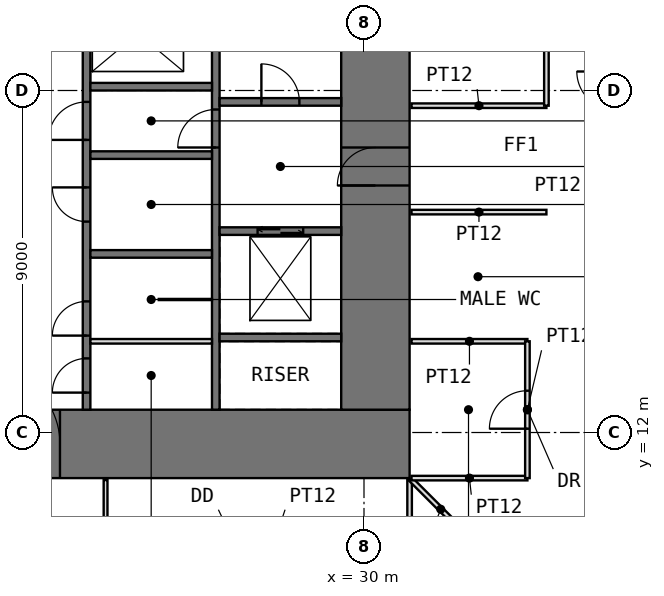
"""IFC4 building model, lengths in metres.
Left out: names, types, materials, properties, quantities, classifications, styles, units other than length and angle.
Written with IfcOpenShell. Run it as: python <this file> out.ifc"""

import sys

from ifc_helpers import new_model, si_unit, direction, frame, frame_2d, origin, place, context, subcontext, project, spatial, rectangle, extrude, element, fill, save


model = new_model("IFC4")
c1 = context("Model", 3, precision=1e-05, world=origin(), true_north=direction((0.0, 1.0)))
c2 = subcontext(c1, "Body", "Model", "MODEL_VIEW")
j1 = project(units=[si_unit("LENGTHUNIT", "METRE"), si_unit("PLANEANGLEUNIT", "RADIAN")], contexts=[c1])
p1 = place(None, origin())
s1 = spatial("IfcSite", under=j1, at=p1, CompositionType="ELEMENT")
p2 = place(p1, origin())
s2 = spatial("IfcBuilding", under=s1, at=p2, CompositionType="ELEMENT")
p3 = place(p2, frame((0.0, 0.0, 62.5)))
s3 = spatial("IfcBuildingStorey", under=s2, at=p3, CompositionType="ELEMENT", Elevation=62.5)
p4 = place(p3, frame((10.8, 11.7, -0.05), z_axis=(0.0, 0.0, 1.0), x_axis=(1.0, 0.0, 0.0)))
e1 = element("IfcWall", 1, at=p4, inside=s3, PredefinedType="SHEAR", context=c2, shape_type="SweptSolid", body=[
    extrude(rectangle(XDim=20.4, YDim=1.8, at=frame_2d((10.2, 0.0))), origin(), (0.0, 0.0, 1.0), 4.0),
])
p5 = place(p4, frame((9.2, 0.0, 0.05)))
e2 = element("IfcOpeningElement", 2, at=p5, cuts=e1, PredefinedType="OPENING", context=c2, shape_type="SweptSolid", body=[
    extrude(rectangle(XDim=2.0, YDim=2.2, at=frame_2d((1.0, 1.1))), frame((0.0, 0.91, 0.0), z_axis=(0.0, -1.0, 0.0), x_axis=(1.0, 0.0, 0.0)), (0.0, 0.0, 1.0), 1.82),
])
p6 = place(p3, frame((30.3, 12.6, -0.05), z_axis=(0.0, 0.0, 1.0), x_axis=(0.0, 1.0, 0.0)))
e3 = element("IfcWall", 3, at=p6, inside=s3, PredefinedType="SHEAR", context=c2, shape_type="SweptSolid", body=[
    extrude(rectangle(XDim=16.8, YDim=1.8, at=frame_2d((8.4, 0.0))), origin(), (0.0, 0.0, 1.0), 4.0),
])
p7 = place(p6, frame((5.9, 0.0, 0.05)))
e4 = element("IfcOpeningElement", 4, at=p7, cuts=e3, PredefinedType="OPENING", context=c2, shape_type="SweptSolid", body=[
    extrude(rectangle(XDim=1.0, YDim=2.2, at=frame_2d((0.5, 1.1))), frame((0.0, 0.91, 0.0), z_axis=(0.0, -1.0, 0.0), x_axis=(1.0, 0.0, 0.0)), (0.0, 0.0, 1.0), 1.82),
])
p8 = place(p3, frame((22.7, 12.6, -0.05), z_axis=(0.0, 0.0, 1.0), x_axis=(0.0, 1.0, 0.0)))
e5 = element("IfcWall", 5, at=p8, inside=s3, PredefinedType="SHEAR", context=c2, shape_type="SweptSolid", body=[
    extrude(rectangle(XDim=16.8, YDim=0.2, at=frame_2d((8.4, 0.0))), origin(), (0.0, 0.0, 1.0), 4.0),
])
p9 = place(p8, frame((0.45, 0.0, 0.05)))
e6 = element("IfcOpeningElement", 6, at=p9, cuts=e5, PredefinedType="OPENING", context=c2, shape_type="SweptSolid", body=[
    extrude(rectangle(XDim=0.9, YDim=2.2, at=frame_2d((0.45, 1.1))), frame((0.0, 0.11, 0.0), z_axis=(0.0, -1.0, 0.0), x_axis=(1.0, 0.0, 0.0)), (0.0, 0.0, 1.0), 0.22),
])
p10 = place(p8, frame((7.1, 0.0, 0.05)))
e7 = element("IfcOpeningElement", 7, at=p10, cuts=e5, PredefinedType="OPENING", context=c2, shape_type="SweptSolid", body=[
    extrude(rectangle(XDim=1.0, YDim=2.2, at=frame_2d((0.5, 1.1))), frame((0.0, 0.11, 0.0), z_axis=(0.0, -1.0, 0.0), x_axis=(1.0, 0.0, 0.0)), (0.0, 0.0, 1.0), 0.22),
])
p11 = place(p8, frame((1.95, 0.0, 0.05)))
e8 = element("IfcOpeningElement", 8, at=p11, cuts=e5, PredefinedType="OPENING", context=c2, shape_type="SweptSolid", body=[
    extrude(rectangle(XDim=0.9, YDim=2.2, at=frame_2d((0.45, 1.1))), frame((0.0, 0.11, 0.0), z_axis=(0.0, -1.0, 0.0), x_axis=(1.0, 0.0, 0.0)), (0.0, 0.0, 1.0), 0.22),
])
p12 = place(p8, frame((4.95, 0.0, 0.05)))
e9 = element("IfcOpeningElement", 9, at=p12, cuts=e5, PredefinedType="OPENING", context=c2, shape_type="SweptSolid", body=[
    extrude(rectangle(XDim=0.9, YDim=2.2, at=frame_2d((0.45, 1.1))), frame((0.0, 0.11, 0.0), z_axis=(0.0, -1.0, 0.0), x_axis=(1.0, 0.0, 0.0)), (0.0, 0.0, 1.0), 0.22),
])
p13 = place(p3, frame((26.1, 12.6, -0.05), z_axis=(0.0, 0.0, 1.0), x_axis=(0.0, 1.0, 0.0)))
e10 = element("IfcWall", 10, at=p13, inside=s3, PredefinedType="SHEAR", context=c2, shape_type="SweptSolid", body=[
    extrude(rectangle(XDim=16.8, YDim=0.2, at=frame_2d((8.4, 0.0))), origin(), (0.0, 0.0, 1.0), 4.0),
])
p14 = place(p13, frame((6.9, 0.0, 0.05)))
e11 = element("IfcOpeningElement", 11, at=p14, cuts=e10, PredefinedType="OPENING", context=c2, shape_type="SweptSolid", body=[
    extrude(rectangle(XDim=1.0, YDim=2.2, at=frame_2d((0.5, 1.1))), frame((0.0, 0.11, 0.0), z_axis=(0.0, -1.0, 0.0), x_axis=(1.0, 0.0, 0.0)), (0.0, 0.0, 1.0), 0.22),
])
for number, where, z_axis, x_axis in (
    (12, (22.8, 16.7, -0.05), (0.0, 0.0, 1.0), (1.0, 0.0, 0.0)),
    (13, (22.8, 19.3, -0.05), (0.0, 0.0, 1.0), (1.0, 0.0, 0.0)),
    (14, (22.8, 21.1, -0.05), (0.0, 0.0, 1.0), (1.0, 0.0, 0.0)),
    (15, (26.2, 14.5, -0.05), (0.0, 0.0, 1.0), (1.0, 0.0, 0.0)),
):
    element("IfcWall", number, at=place(p3, frame(where, z_axis=z_axis, x_axis=x_axis)), inside=s3, PredefinedType="SHEAR", context=c2, shape_type="SweptSolid", body=[
        extrude(rectangle(XDim=3.2, YDim=0.2, at=frame_2d((1.6, 0.0))), origin(), (0.0, 0.0, 1.0), 4.0),
    ])
p15 = place(p3, frame((26.2, 17.3, -0.05), z_axis=(0.0, 0.0, 1.0), x_axis=(1.0, 0.0, 0.0)))
e16 = element("IfcWall", 16, at=p15, inside=s3, PredefinedType="SHEAR", context=c2, shape_type="SweptSolid", body=[
    extrude(rectangle(XDim=3.2, YDim=0.2, at=frame_2d((1.6, 0.0))), origin(), (0.0, 0.0, 1.0), 4.0),
])
p16 = place(p15, frame((1.0, 0.0, 0.05)))
e17 = element("IfcOpeningElement", 17, at=p16, cuts=e16, PredefinedType="OPENING", context=c2, shape_type="SweptSolid", body=[
    extrude(rectangle(XDim=1.2, YDim=2.2, at=frame_2d((0.6, 1.1))), frame((0.0, 0.11, 0.0), z_axis=(0.0, -1.0, 0.0), x_axis=(1.0, 0.0, 0.0)), (0.0, 0.0, 1.0), 0.22),
])
p17 = place(p3, frame((26.2, 20.7, -0.05), z_axis=(0.0, 0.0, 1.0), x_axis=(1.0, 0.0, 0.0)))
e18 = element("IfcWall", 18, at=p17, inside=s3, PredefinedType="SHEAR", context=c2, shape_type="SweptSolid", body=[
    extrude(rectangle(XDim=3.2, YDim=0.2, at=frame_2d((1.6, 0.0))), origin(), (0.0, 0.0, 1.0), 4.0),
])
p18 = place(p17, frame((1.1, 0.0, 0.05)))
e19 = element("IfcOpeningElement", 19, at=p18, cuts=e18, PredefinedType="OPENING", context=c2, shape_type="SweptSolid", body=[
    extrude(rectangle(XDim=1.0, YDim=2.2, at=frame_2d((0.5, 1.1))), frame((0.0, 0.11, 0.0), z_axis=(0.0, -1.0, 0.0), x_axis=(1.0, 0.0, 0.0)), (0.0, 0.0, 1.0), 0.22),
])
p19 = place(p3, frame((22.8, 14.4, 0.0), z_axis=(0.0, 0.0, 1.0), x_axis=(1.0, 0.0, 0.0)))
e20 = element("IfcWall", 20, at=p19, inside=s3, PredefinedType="PARTITIONING", context=c2, shape_type="SweptSolid", body=[
    extrude(rectangle(XDim=3.2, YDim=0.12, at=frame_2d((1.6, 0.0))), origin(), (0.0, 0.0, 1.0), 3.75),
])
p20 = place(p3, frame((24.6, 15.5, 0.0), z_axis=(0.0, 0.0, 1.0), x_axis=(1.0, 0.0, 0.0)))
e21 = element("IfcWall", 21, at=p20, inside=s3, PredefinedType="PARTITIONING", context=c2, shape_type="SweptSolid", body=[
    extrude(rectangle(XDim=1.4, YDim=0.03, at=frame_2d((0.7, 0.0))), origin(), (0.0, 0.0, 1.0), 3.75),
])
p21 = place(p3, frame((23.2, 7.8, 0.0), z_axis=(0.0, 0.0, 1.0), x_axis=(0.0, 1.0, 0.0)))
e22 = element("IfcWall", 22, at=p21, inside=s3, PredefinedType="PARTITIONING", context=c2, shape_type="SweptSolid", body=[
    extrude(rectangle(XDim=2.95, YDim=0.1, at=frame_2d((1.475, 0.0))), origin(), (0.0, 0.0, 1.0), 3.75),
])
p22 = place(p3, frame((31.2, 7.8, 0.0), z_axis=(0.0, 0.0, 1.0), x_axis=(0.0, 1.0, 0.0)))
e23 = element("IfcWall", 23, at=p22, inside=s3, PredefinedType="PARTITIONING", context=c2, shape_type="SweptSolid", body=[
    extrude(rectangle(XDim=2.95, YDim=0.12, at=frame_2d((1.475, 0.0))), origin(), (0.0, 0.0, 1.0), 3.75),
])
p23 = place(p3, frame((31.235, 10.765, 0.0), z_axis=(0.0, 0.0, 1.0), x_axis=(0.707106781187, -0.707106781187, 0.0)))
e24 = element("IfcWall", 24, at=p23, inside=s3, PredefinedType="PARTITIONING", context=c2, shape_type="SweptSolid", body=[
    extrude(rectangle(XDim=2.218, YDim=0.12, at=frame_2d((1.109, 0.0))), origin(), (0.0, 0.0, 1.0), 3.75),
])
for number, where, z_axis, x_axis in (
    (25, (31.25, 10.8, 0.0), (0.0, 0.0, 1.0), (1.0, 0.0, 0.0)),
    (26, (31.25, 14.4, 0.0), (0.0, 0.0, 1.0), (1.0, 0.0, 0.0)),
):
    element("IfcWall", number, at=place(p3, frame(where, z_axis=z_axis, x_axis=x_axis)), inside=s3, PredefinedType="PARTITIONING", context=c2, shape_type="SweptSolid", body=[
        extrude(rectangle(XDim=3.05, YDim=0.12, at=frame_2d((1.525, 0.0))), origin(), (0.0, 0.0, 1.0), 3.75),
    ])
for number, where, z_axis, x_axis in (
    (27, (31.25, 17.8, 0.0), (0.0, 0.0, 1.0), (1.0, 0.0, 0.0)),
    (28, (31.25, 20.6, 0.0), (0.0, 0.0, 1.0), (1.0, 0.0, 0.0)),
):
    element("IfcWall", number, at=place(p3, frame(where, z_axis=z_axis, x_axis=x_axis)), inside=s3, PredefinedType="PARTITIONING", context=c2, shape_type="SweptSolid", body=[
        extrude(rectangle(XDim=3.55, YDim=0.12, at=frame_2d((1.775, 0.0))), origin(), (0.0, 0.0, 1.0), 3.75),
    ])
p24 = place(p3, frame((34.3, 10.8, 0.0), z_axis=(0.0, 0.0, 1.0), x_axis=(0.0, 1.0, 0.0)))
e29 = element("IfcWall", 29, at=p24, inside=s3, PredefinedType="PARTITIONING", context=c2, shape_type="SweptSolid", body=[
    extrude(rectangle(XDim=3.6, YDim=0.12, at=frame_2d((1.8, 0.0))), origin(), (0.0, 0.0, 1.0), 3.75),
])
p25 = place(p24, frame((1.3, 0.0, 0.0)))
e30 = element("IfcOpeningElement", 30, at=p25, cuts=e29, PredefinedType="OPENING", context=c2, shape_type="SweptSolid", body=[
    extrude(rectangle(XDim=1.0, YDim=2.2, at=frame_2d((0.5, 1.1))), frame((0.0, 0.07, 0.0), z_axis=(0.0, -1.0, 0.0), x_axis=(1.0, 0.0, 0.0)), (0.0, 0.0, 1.0), 0.14),
])
p26 = place(p3, frame((34.8, 20.6, 0.0), z_axis=(0.0, 0.0, 1.0), x_axis=(0.0, 1.0, 0.0)))
e31 = element("IfcWall", 31, at=p26, inside=s3, PredefinedType="PARTITIONING", context=c2, shape_type="SweptSolid", body=[
    extrude(rectangle(XDim=4.0, YDim=0.12, at=frame_2d((2.0, 0.0))), origin(), (0.0, 0.0, 1.0), 3.75),
])
p27 = place(p26, frame((1.5, 0.0, 0.0)))
e32 = element("IfcOpeningElement", 32, at=p27, cuts=e31, PredefinedType="OPENING", context=c2, shape_type="SweptSolid", body=[
    extrude(rectangle(XDim=1.0, YDim=2.4, at=frame_2d((0.5, 1.2))), frame((0.0, 0.07, 0.0), z_axis=(0.0, -1.0, 0.0), x_axis=(1.0, 0.0, 0.0)), (0.0, 0.0, 1.0), 0.14),
])
p28 = place(p5, origin())
e33 = element("IfcDoor", 33, at=p28, inside=s3, OperationType="DOUBLE_DOOR_SINGLE_SWING", PredefinedType="DOOR", context=c2, shape_type="SweptSolid", body=[
    extrude(rectangle(XDim=2.0, YDim=2.2, at=frame_2d((1.0, 1.1))), frame((0.0, 0.025, 0.0), z_axis=(0.0, -1.0, 0.0), x_axis=(1.0, 0.0, 0.0)), (0.0, 0.0, 1.0), 0.05),
])
fill(e2, e33)
p29 = place(p9, origin())
e34 = element("IfcDoor", 34, at=p29, inside=s3, OperationType="SINGLE_SWING_LEFT", PredefinedType="DOOR", context=c2, shape_type="SweptSolid", body=[
    extrude(rectangle(XDim=0.9, YDim=2.2, at=frame_2d((0.45, 1.1))), frame((0.0, 0.025, 0.0), z_axis=(0.0, -1.0, 0.0), x_axis=(1.0, 0.0, 0.0)), (0.0, 0.0, 1.0), 0.05),
])
fill(e6, e34)
p30 = place(p7, origin())
e35 = element("IfcDoor", 35, at=p30, inside=s3, OperationType="SINGLE_SWING_LEFT", PredefinedType="DOOR", context=c2, shape_type="SweptSolid", body=[
    extrude(rectangle(XDim=1.0, YDim=2.2, at=frame_2d((0.5, 1.1))), frame((0.0, 0.025, 0.0), z_axis=(0.0, -1.0, 0.0), x_axis=(1.0, 0.0, 0.0)), (0.0, 0.0, 1.0), 0.05),
])
fill(e4, e35)
p31 = place(p18, origin())
e36 = element("IfcDoor", 36, at=p31, inside=s3, OperationType="SINGLE_SWING_LEFT", PredefinedType="DOOR", context=c2, shape_type="SweptSolid", body=[
    extrude(rectangle(XDim=1.0, YDim=2.2, at=frame_2d((0.5, 1.1))), frame((0.0, 0.025, 0.0), z_axis=(0.0, -1.0, 0.0), x_axis=(1.0, 0.0, 0.0)), (0.0, 0.0, 1.0), 0.05),
])
fill(e19, e36)
p32 = place(p14, origin())
e37 = element("IfcDoor", 37, at=p32, inside=s3, OperationType="SINGLE_SWING_LEFT", PredefinedType="DOOR", context=c2, shape_type="SweptSolid", body=[
    extrude(rectangle(XDim=1.0, YDim=2.2, at=frame_2d((0.5, 1.1))), frame((0.0, 0.025, 0.0), z_axis=(0.0, -1.0, 0.0), x_axis=(1.0, 0.0, 0.0)), (0.0, 0.0, 1.0), 0.05),
])
fill(e11, e37)
p33 = place(p10, origin())
e38 = element("IfcDoor", 38, at=p33, inside=s3, OperationType="SINGLE_SWING_LEFT", PredefinedType="DOOR", context=c2, shape_type="SweptSolid", body=[
    extrude(rectangle(XDim=1.0, YDim=2.2, at=frame_2d((0.5, 1.1))), frame((0.0, 0.025, 0.0), z_axis=(0.0, -1.0, 0.0), x_axis=(1.0, 0.0, 0.0)), (0.0, 0.0, 1.0), 0.05),
])
fill(e7, e38)
p34 = place(p11, origin())
e39 = element("IfcDoor", 39, at=p34, inside=s3, OperationType="SINGLE_SWING_LEFT", PredefinedType="DOOR", context=c2, shape_type="SweptSolid", body=[
    extrude(rectangle(XDim=0.9, YDim=2.2, at=frame_2d((0.45, 1.1))), frame((0.0, 0.025, 0.0), z_axis=(0.0, -1.0, 0.0), x_axis=(1.0, 0.0, 0.0)), (0.0, 0.0, 1.0), 0.05),
])
fill(e8, e39)
p35 = place(p12, origin())
e40 = element("IfcDoor", 40, at=p35, inside=s3, OperationType="SINGLE_SWING_RIGHT", PredefinedType="DOOR", context=c2, shape_type="SweptSolid", body=[
    extrude(rectangle(XDim=0.9, YDim=2.2, at=frame_2d((0.45, 1.1))), frame((0.0, 0.025, 0.0), z_axis=(0.0, -1.0, 0.0), x_axis=(1.0, 0.0, 0.0)), (0.0, 0.0, 1.0), 0.05),
])
fill(e9, e40)
p36 = place(p25, origin())
e41 = element("IfcDoor", 41, at=p36, inside=s3, OperationType="SINGLE_SWING_LEFT", PredefinedType="DOOR", context=c2, shape_type="SweptSolid", body=[
    extrude(rectangle(XDim=1.0, YDim=2.2, at=frame_2d((0.5, 1.1))), frame((0.0, 0.025, 0.0), z_axis=(0.0, -1.0, 0.0), x_axis=(1.0, 0.0, 0.0)), (0.0, 0.0, 1.0), 0.05),
])
fill(e30, e41)
p37 = place(p16, origin())
e42 = element("IfcDoor", 42, at=p37, inside=s3, OperationType="DOUBLE_DOOR_SLIDING", PredefinedType="DOOR", context=c2, shape_type="SweptSolid", body=[
    extrude(rectangle(XDim=1.2, YDim=2.2, at=frame_2d((0.6, 1.1))), frame((0.0, 0.025, 0.0), z_axis=(0.0, -1.0, 0.0), x_axis=(1.0, 0.0, 0.0)), (0.0, 0.0, 1.0), 0.05),
])
fill(e17, e42)
save(model, sys.argv[1])
